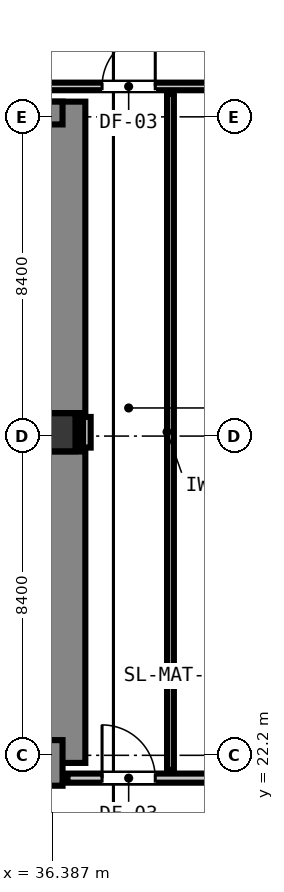
"""IFC4 building model, lengths in metres.
Left out: names, types, materials, properties, quantities, classifications, styles, units other than length and angle.
Written with IfcOpenShell. Run it as: python <this file> out.ifc"""

import sys

from ifc_helpers import new_model, si_unit, direction, frame, frame_2d, origin, origin_2d, place, context, subcontext, project, spatial, rectangle, extrude, element, fill, save


model = new_model("IFC4")
c1 = context("Model", 3, precision=1e-05, world=origin(), true_north=direction((0.0, 1.0)))
c2 = subcontext(c1, "Body", "Model", "MODEL_VIEW")
j1 = project(units=[si_unit("LENGTHUNIT", "METRE"), si_unit("PLANEANGLEUNIT", "RADIAN")], contexts=[c1])
p1 = place(None, origin())
s1 = spatial("IfcSite", under=j1, at=p1, CompositionType="ELEMENT")
p2 = place(p1, origin())
s2 = spatial("IfcBuilding", under=s1, at=p2, CompositionType="ELEMENT")
p3 = place(p2, frame((0.0, 0.0, -13.2)))
s3 = spatial("IfcBuildingStorey", under=s2, at=p3, CompositionType="ELEMENT", Elevation=-13.2)
p4 = place(p3, frame((36.5, 30.7, -0.4), z_axis=(0.0, 0.0, 1.0), x_axis=(1.0, 0.0, 0.0)))
e1 = element("IfcColumn", 1, at=p4, inside=s3, PredefinedType="COLUMN", context=c2, shape_type="SweptSolid", body=[
    extrude(rectangle(XDim=1.0, YDim=1.0, at=origin_2d()), origin(), (0.0, 0.0, 1.0), 4.8),
])
p5 = place(p3, frame((36.66, 22.0, 0.0), z_axis=(0.0, 0.0, 1.0), x_axis=(0.0, 1.0, 0.0)))
e2 = element("IfcWall", 2, at=p5, inside=s3, PredefinedType="SHEAR", context=c2, shape_type="SweptSolid", body=[
    extrude(rectangle(XDim=8.195, YDim=1.2, at=frame_2d((4.098, 0.0))), origin(), (0.0, 0.0, 1.0), 4.4),
])
p6 = place(p3, frame((36.66, 31.205, 0.0), z_axis=(0.0, 0.0, 1.0), x_axis=(0.0, 1.0, 0.0)))
e3 = element("IfcWall", 3, at=p6, inside=s3, PredefinedType="SHEAR", context=c2, shape_type="SweptSolid", body=[
    extrude(rectangle(XDim=8.195, YDim=1.2, at=frame_2d((4.097, 0.0))), origin(), (0.0, 0.0, 1.0), 4.4),
])
p7 = place(p3, frame((29.705, 22.0, 0.0), z_axis=(0.0, 0.0, 1.0), x_axis=(1.0, 0.0, 0.0)))
e4 = element("IfcWall", 4, at=p7, inside=s3, PredefinedType="SHEAR", context=c2, shape_type="SweptSolid", body=[
    extrude(rectangle(XDim=6.955, YDim=1.2, at=frame_2d((3.478, 0.0))), origin(), (0.0, 0.0, 1.0), 4.4),
])
p8 = place(p3, frame((32.58, 39.1, 0.0), z_axis=(0.0, 0.0, 1.0), x_axis=(1.0, 0.0, 0.0)))
e5 = element("IfcWall", 5, at=p8, inside=s3, PredefinedType="SHEAR", context=c2, shape_type="SweptSolid", body=[
    extrude(rectangle(XDim=4.08, YDim=0.6, at=frame_2d((2.04, 0.0))), origin(), (0.0, 0.0, 1.0), 4.4),
])
p9 = place(p3, frame((36.79, 21.6, 0.0), z_axis=(0.0, 0.0, 1.0), x_axis=(1.0, 0.0, 0.0)))
e6 = element("IfcWall", 6, at=p9, inside=s3, PredefinedType="PARTITIONING", context=c2, shape_type="SweptSolid", body=[
    extrude(rectangle(XDim=9.078, YDim=0.24, at=frame_2d((4.539, 0.0))), origin(), (0.0, 0.0, 1.0), 3.335),
])
p10 = place(p9, frame((0.91, 0.0, 0.0)))
e7 = element("IfcOpeningElement", 7, at=p10, cuts=e6, PredefinedType="OPENING", context=c2, shape_type="SweptSolid", body=[
    extrude(rectangle(XDim=1.4, YDim=2.15, at=frame_2d((0.7, 1.075))), frame((0.0, 0.13, 0.0), z_axis=(0.0, -1.0, 0.0), x_axis=(1.0, 0.0, 0.0)), (0.0, 0.0, 1.0), 0.26),
])
p11 = place(p3, frame((29.812, 39.8, 0.0), z_axis=(0.0, 0.0, 1.0), x_axis=(1.0, 0.0, 0.0)))
e8 = element("IfcWall", 8, at=p11, inside=s3, PredefinedType="PARTITIONING", context=c2, shape_type="SweptSolid", body=[
    extrude(rectangle(XDim=16.076, YDim=0.2, at=frame_2d((8.038, 0.0))), origin(), (0.0, 0.0, 1.0), 3.335),
])
p12 = place(p11, frame((7.888, 0.0, 0.0)))
e9 = element("IfcOpeningElement", 9, at=p12, cuts=e8, PredefinedType="OPENING", context=c2, shape_type="SweptSolid", body=[
    extrude(rectangle(XDim=1.4, YDim=2.15, at=frame_2d((0.7, 1.075))), frame((0.0, 0.11, 0.0), z_axis=(0.0, -1.0, 0.0), x_axis=(1.0, 0.0, 0.0)), (0.0, 0.0, 1.0), 0.22),
])
p13 = place(p3, frame((37.3, 30.297, 0.0), z_axis=(0.0, 0.0, 1.0), x_axis=(0.0, 1.0, 0.0)))
e10 = element("IfcWall", 10, at=p13, inside=s3, PredefinedType="PARTITIONING", context=c2, shape_type="SweptSolid", body=[
    extrude(rectangle(XDim=0.806, YDim=0.2, at=frame_2d((0.403, 0.0))), origin(), (0.0, 0.0, 1.0), 4.1),
])
p14 = place(p3, frame((39.5, 21.818, 0.0), z_axis=(0.0, 0.0, 1.0), x_axis=(0.0, 1.0, 0.0)))
e11 = element("IfcWall", 11, at=p14, inside=s3, PredefinedType="PARTITIONING", context=c2, shape_type="SweptSolid", body=[
    extrude(rectangle(XDim=17.784, YDim=0.18, at=frame_2d((8.892, 0.0))), origin(), (0.0, 0.0, 1.0), 4.1),
])
p15 = place(p3, frame((37.032, 30.21, 0.0), z_axis=(0.0, 0.0, 1.0), x_axis=(0.0, 1.0, 0.0)))
e12 = element("IfcWall", 12, at=p15, inside=s3, PredefinedType="PARTITIONING", context=c2, shape_type="SweptSolid", body=[
    extrude(rectangle(XDim=0.98, YDim=0.06, at=frame_2d((0.49, 0.0))), origin(), (0.0, 0.0, 1.0), 1.45),
])
p16 = place(p10, origin())
e13 = element("IfcDoor", 13, at=p16, inside=s3, OperationType="SINGLE_SWING_LEFT", PredefinedType="DOOR", context=c2, shape_type="SweptSolid", body=[
    extrude(rectangle(XDim=1.4, YDim=2.15, at=frame_2d((0.7, 1.075))), frame((0.0, 0.025, 0.0), z_axis=(0.0, -1.0, 0.0), x_axis=(1.0, 0.0, 0.0)), (0.0, 0.0, 1.0), 0.05),
])
fill(e7, e13)
p17 = place(p12, origin())
e14 = element("IfcDoor", 14, at=p17, inside=s3, OperationType="SINGLE_SWING_RIGHT", PredefinedType="DOOR", context=c2, shape_type="SweptSolid", body=[
    extrude(rectangle(XDim=1.4, YDim=2.15, at=frame_2d((0.7, 1.075))), frame((0.0, 0.025, 0.0), z_axis=(0.0, -1.0, 0.0), x_axis=(1.0, 0.0, 0.0)), (0.0, 0.0, 1.0), 0.05),
])
fill(e9, e14)
save(model, sys.argv[1])
